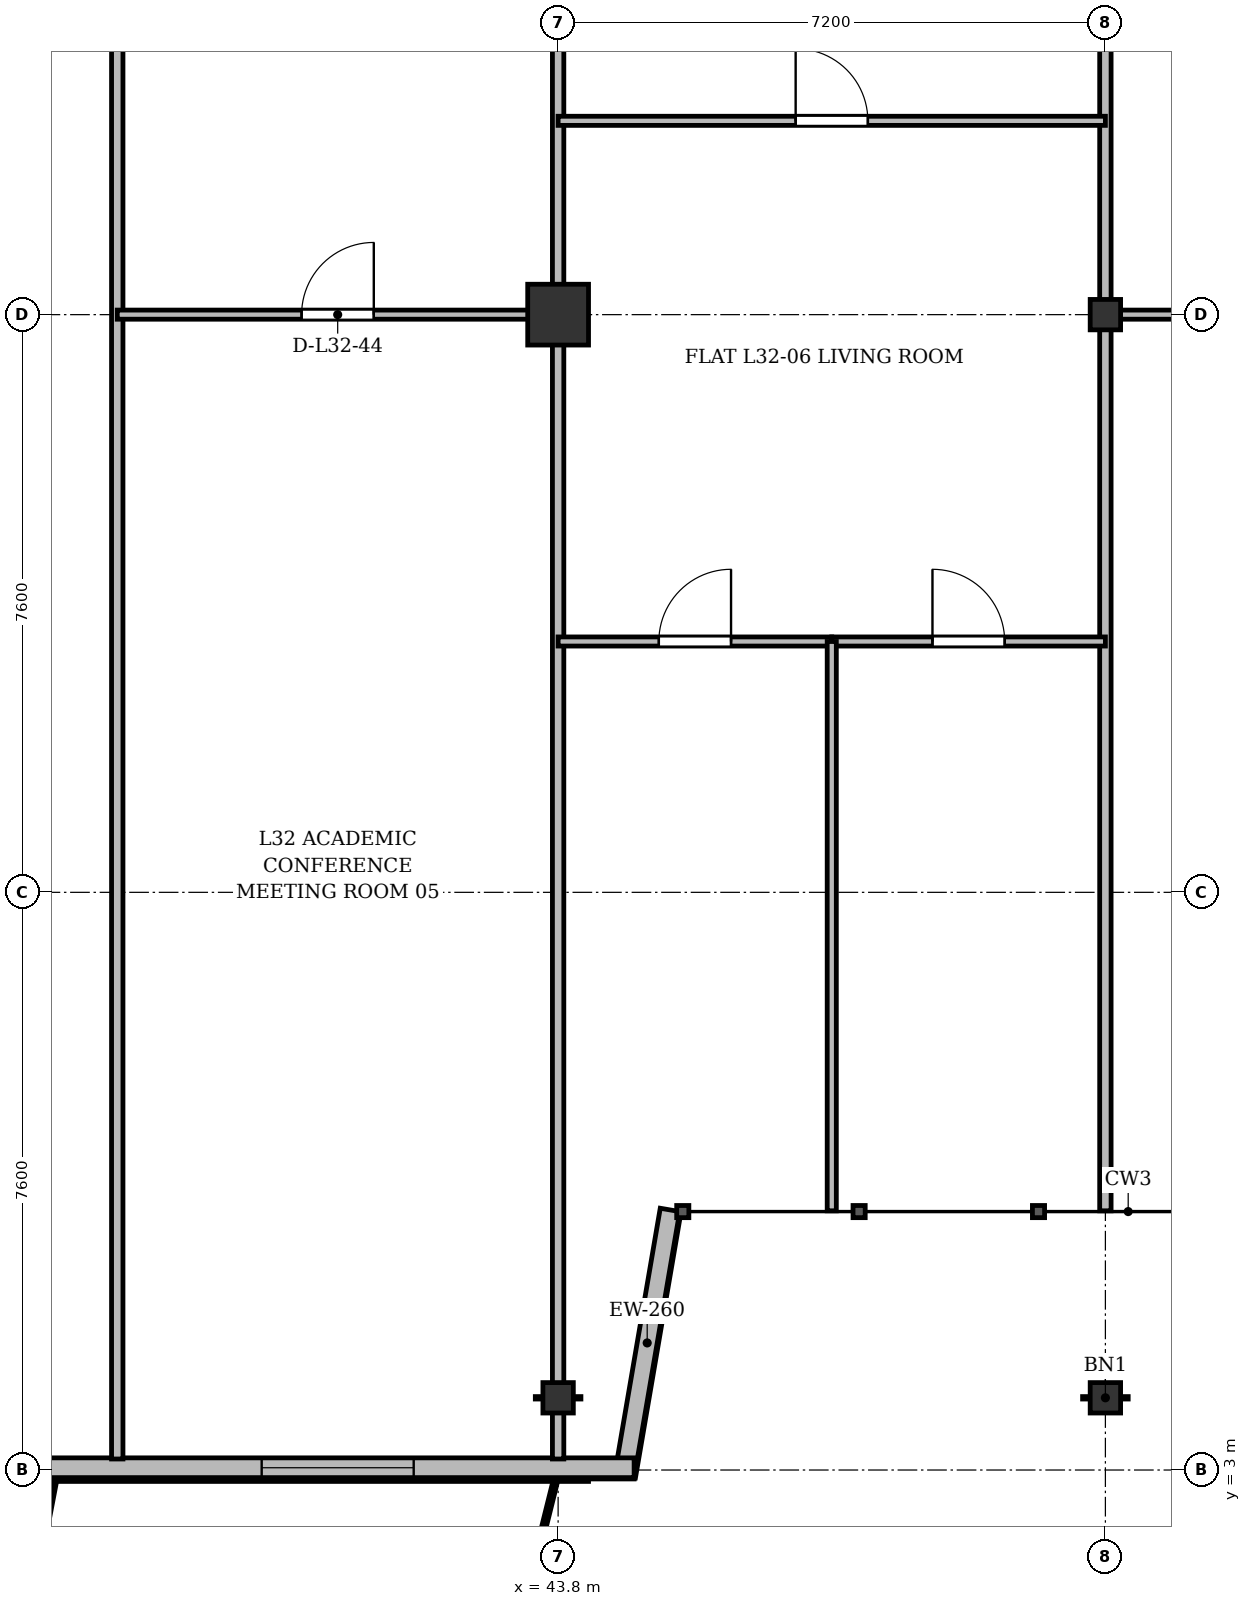
"""IFC4 building model, lengths in metres.
Left out: names, types, materials, properties, quantities, classifications, styles, units other than length and angle.
Written with IfcOpenShell. Run it as: python <this file> out.ifc"""

import sys

from ifc_helpers import new_model, si_unit, direction, frame, frame_2d, origin, origin_2d, place, context, subcontext, project, spatial, rectangle, i_section, extrude, source, transform, mapped, element, fill, save


model = new_model("IFC4")
c1 = context("Model", 3, precision=1e-05, world=origin(), true_north=direction((0.0, 1.0)))
c2 = subcontext(c1, "Body", "Model", "MODEL_VIEW")
j1 = project(units=[si_unit("LENGTHUNIT", "METRE"), si_unit("PLANEANGLEUNIT", "RADIAN")], contexts=[c1])
p1 = place(None, origin())
s1 = spatial("IfcSite", under=j1, at=p1, CompositionType="ELEMENT")
p2 = place(p1, origin())
s2 = spatial("IfcBuilding", under=s1, at=p2, CompositionType="ELEMENT")
p3 = place(p2, frame((0.0, 0.0, 124.9)))
s3 = spatial("IfcBuildingStorey", under=s2, at=p3, CompositionType="ELEMENT", Elevation=124.9)
m1 = source(origin(), c2, "Body", "SweptSolid", [
    extrude(i_section(OverallWidth=0.4, OverallDepth=0.4, WebThickness=0.022, FlangeThickness=0.035, at=origin_2d()), origin(), (0.0, 0.0, 1.0), 3.6),
])
p4 = place(p3, frame((43.8, 3.95, 0.0), z_axis=(0.0, 0.0, 1.0), x_axis=(1.0, 0.0, 0.0)))
e1 = element("IfcColumn", 1, at=p4, inside=s3, PredefinedType="COLUMN", context=c2, shape_type="MappedRepresentation", body=[
    mapped(m1, transform((0.0, 0.0, 0.0), x_axis=(1.0, 0.0, 0.0), y_axis=(0.0, 1.0, 0.0), z_axis=(0.0, 0.0, 1.0), scale=1.0)),
])
m2 = source(origin(), c2, "Body", "SweptSolid", [
    extrude(rectangle(XDim=0.8, YDim=0.8, at=origin_2d()), origin(), (0.0, 0.0, 1.0), 3.6),
])
p5 = place(p3, frame((43.8, 18.2, 0.0), z_axis=(0.0, 0.0, 1.0), x_axis=(1.0, 0.0, 0.0)))
e2 = element("IfcColumn", 2, at=p5, inside=s3, PredefinedType="COLUMN", context=c2, shape_type="MappedRepresentation", body=[
    mapped(m2, transform((0.0, 0.0, 0.0), x_axis=(1.0, 0.0, 0.0), y_axis=(0.0, 1.0, 0.0), z_axis=(0.0, 0.0, 1.0), scale=1.0)),
])
for number, where, z_axis, x_axis in (
    (3, (51.0, 3.95, 0.0), (0.0, 0.0, 1.0), (1.0, 0.0, 0.0)),
    (4, (51.0, 18.2, 0.0), (0.0, 0.0, 1.0), (1.0, 0.0, 0.0)),
):
    element("IfcColumn", number, at=place(p3, frame(where, z_axis=z_axis, x_axis=x_axis)), inside=s3, PredefinedType="COLUMN", context=c2, shape_type="MappedRepresentation", body=[
        mapped(m1, transform((0.0, 0.0, 0.0), x_axis=(1.0, 0.0, 0.0), y_axis=(0.0, 1.0, 0.0), z_axis=(0.0, 0.0, 1.0), scale=1.0)),
    ])
p6 = place(p3, frame((45.272, 6.422, 0.0), z_axis=(0.0, 0.0, 1.0), x_axis=(-0.168990530437, -0.98561767467, 0.0)))
e5 = element("IfcWall", 5, at=p6, inside=s3, PredefinedType="SOLIDWALL", context=c2, shape_type="SweptSolid", body=[
    extrude(rectangle(XDim=3.551, YDim=0.26, at=frame_2d((1.775, 0.0))), origin(), (0.0, 0.0, 1.0), 2.752),
])
p7 = place(p3, frame((44.8, 3.03, 0.0), z_axis=(0.0, 0.0, 1.0), x_axis=(-1.0, 0.0, 0.0)))
e6 = element("IfcWall", 6, at=p7, inside=s3, PredefinedType="SOLIDWALL", context=c2, shape_type="SweptSolid", body=[
    extrude(rectangle(XDim=37.3, YDim=0.26, at=frame_2d((18.65, 0.0))), origin(), (0.0, 0.0, 1.0), 3.34),
])
p8 = place(p7, frame((2.9, 0.0, 0.9)))
e7 = element("IfcOpeningElement", 7, at=p8, cuts=e6, PredefinedType="OPENING", context=c2, shape_type="SweptSolid", body=[
    extrude(rectangle(XDim=2.0, YDim=1.95, at=frame_2d((1.0, 0.975))), frame((0.0, 0.14, 0.0), z_axis=(0.0, -1.0, 0.0), x_axis=(1.0, 0.0, 0.0)), (0.0, 0.0, 1.0), 0.28),
])
p9 = place(p7, frame((9.675, 0.0, 0.9)))
e8 = element("IfcOpeningElement", 8, at=p9, cuts=e6, PredefinedType="OPENING", context=c2, shape_type="SweptSolid", body=[
    extrude(rectangle(XDim=1.65, YDim=1.85, at=frame_2d((0.825, 0.925))), frame((0.0, 0.14, 0.0), z_axis=(0.0, -1.0, 0.0), x_axis=(1.0, 0.0, 0.0)), (0.0, 0.0, 1.0), 0.28),
])
p10 = place(p7, frame((17.109, 0.0, 0.0)))
e9 = element("IfcOpeningElement", 9, at=p10, cuts=e6, PredefinedType="OPENING", context=c2, shape_type="SweptSolid", body=[
    extrude(rectangle(XDim=1.2, YDim=2.2, at=frame_2d((0.6, 1.1))), frame((0.0, 0.14, 0.0), z_axis=(0.0, -1.0, 0.0), x_axis=(1.0, 0.0, 0.0)), (0.0, 0.0, 1.0), 0.28),
])
p11 = place(p7, frame((22.25, 0.0, 0.9)))
e10 = element("IfcOpeningElement", 10, at=p11, cuts=e6, PredefinedType="OPENING", context=c2, shape_type="SweptSolid", body=[
    extrude(rectangle(XDim=2.2, YDim=1.8, at=frame_2d((1.1, 0.9))), frame((0.0, 0.14, 0.0), z_axis=(0.0, -1.0, 0.0), x_axis=(1.0, 0.0, 0.0)), (0.0, 0.0, 1.0), 0.28),
])
p12 = place(p7, frame((26.5, 0.0, 0.9)))
e11 = element("IfcOpeningElement", 11, at=p12, cuts=e6, PredefinedType="OPENING", context=c2, shape_type="SweptSolid", body=[
    extrude(rectangle(XDim=1.5, YDim=1.75, at=frame_2d((0.75, 0.875))), frame((0.0, 0.14, 0.0), z_axis=(0.0, -1.0, 0.0), x_axis=(1.0, 0.0, 0.0)), (0.0, 0.0, 1.0), 0.28),
])
p13 = place(p7, frame((33.727, 0.0, 0.0)))
e12 = element("IfcOpeningElement", 12, at=p13, cuts=e6, PredefinedType="OPENING", context=c2, shape_type="SweptSolid", body=[
    extrude(rectangle(XDim=1.2, YDim=2.2, at=frame_2d((0.6, 1.1))), frame((0.0, 0.14, 0.0), z_axis=(0.0, -1.0, 0.0), x_axis=(1.0, 0.0, 0.0)), (0.0, 0.0, 1.0), 0.28),
])
p14 = place(p3, frame((38.0, 3.145, 0.0), z_axis=(0.0, 0.0, 1.0), x_axis=(0.0, 1.0, 0.0)))
e13 = element("IfcWall", 13, at=p14, inside=s3, PredefinedType="PARTITIONING", context=c2, shape_type="SweptSolid", body=[
    extrude(rectangle(XDim=24.455, YDim=0.15, at=frame_2d((12.228, 0.0))), origin(), (0.0, 0.0, 1.0), 2.752),
])
p15 = place(p3, frame((43.8, 3.145, 0.0), z_axis=(0.0, 0.0, 1.0), x_axis=(0.0, 1.0, 0.0)))
e14 = element("IfcWall", 14, at=p15, inside=s3, PredefinedType="PARTITIONING", context=c2, shape_type="SweptSolid", body=[
    extrude(rectangle(XDim=24.455, YDim=0.15, at=frame_2d((12.228, 0.0))), origin(), (0.0, 0.0, 1.0), 2.84),
])
p16 = place(p3, frame((51.0, 6.41, 0.0), z_axis=(0.0, 0.0, 1.0), x_axis=(0.0, 1.0, 0.0)))
e15 = element("IfcWall", 15, at=p16, inside=s3, PredefinedType="PARTITIONING", context=c2, shape_type="SweptSolid", body=[
    extrude(rectangle(XDim=21.19, YDim=0.15, at=frame_2d((10.595, 0.0))), origin(), (0.0, 0.0, 1.0), 2.84),
])
p17 = place(p3, frame((38.0, 18.2, 0.0), z_axis=(0.0, 0.0, 1.0), x_axis=(1.0, 0.0, 0.0)))
e16 = element("IfcWall", 16, at=p17, inside=s3, PredefinedType="PARTITIONING", context=c2, shape_type="SweptSolid", body=[
    extrude(rectangle(XDim=5.8, YDim=0.12, at=frame_2d((2.9, 0.0))), origin(), (0.0, 0.0, 1.0), 2.752),
])
p18 = place(p17, frame((2.425, 0.0, 0.0)))
e17 = element("IfcOpeningElement", 17, at=p18, cuts=e16, PredefinedType="OPENING", context=c2, shape_type="SweptSolid", body=[
    extrude(rectangle(XDim=0.95, YDim=2.15, at=frame_2d((0.475, 1.075))), frame((0.0, 0.07, 0.0), z_axis=(0.0, -1.0, 0.0), x_axis=(1.0, 0.0, 0.0)), (0.0, 0.0, 1.0), 0.14),
])
p19 = place(p3, frame((43.8, 20.75, 0.0), z_axis=(0.0, 0.0, 1.0), x_axis=(1.0, 0.0, 0.0)))
e18 = element("IfcWall", 18, at=p19, inside=s3, PredefinedType="PARTITIONING", context=c2, shape_type="SweptSolid", body=[
    extrude(rectangle(XDim=7.2, YDim=0.12, at=frame_2d((3.6, 0.0))), origin(), (0.0, 0.0, 1.0), 2.84),
])
p20 = place(p19, frame((3.125, 0.0, 0.0)))
e19 = element("IfcOpeningElement", 19, at=p20, cuts=e18, PredefinedType="OPENING", context=c2, shape_type="SweptSolid", body=[
    extrude(rectangle(XDim=0.95, YDim=2.15, at=frame_2d((0.475, 1.075))), frame((0.0, 0.07, 0.0), z_axis=(0.0, -1.0, 0.0), x_axis=(1.0, 0.0, 0.0)), (0.0, 0.0, 1.0), 0.14),
])
p21 = place(p3, frame((43.8, 13.9, 0.0), z_axis=(0.0, 0.0, 1.0), x_axis=(1.0, 0.0, 0.0)))
e20 = element("IfcWall", 20, at=p21, inside=s3, PredefinedType="PARTITIONING", context=c2, shape_type="SweptSolid", body=[
    extrude(rectangle(XDim=3.6, YDim=0.12, at=frame_2d((1.8, 0.0))), origin(), (0.0, 0.0, 1.0), 2.84),
])
p22 = place(p21, frame((1.325, 0.0, 0.0)))
e21 = element("IfcOpeningElement", 21, at=p22, cuts=e20, PredefinedType="OPENING", context=c2, shape_type="SweptSolid", body=[
    extrude(rectangle(XDim=0.95, YDim=2.15, at=frame_2d((0.475, 1.075))), frame((0.0, 0.07, 0.0), z_axis=(0.0, -1.0, 0.0), x_axis=(1.0, 0.0, 0.0)), (0.0, 0.0, 1.0), 0.14),
])
p23 = place(p3, frame((47.4, 13.9, 0.0), z_axis=(0.0, 0.0, 1.0), x_axis=(1.0, 0.0, 0.0)))
e22 = element("IfcWall", 22, at=p23, inside=s3, PredefinedType="PARTITIONING", context=c2, shape_type="SweptSolid", body=[
    extrude(rectangle(XDim=3.6, YDim=0.12, at=frame_2d((1.8, 0.0))), origin(), (0.0, 0.0, 1.0), 2.84),
])
p24 = place(p23, frame((1.325, 0.0, 0.0)))
e23 = element("IfcOpeningElement", 23, at=p24, cuts=e22, PredefinedType="OPENING", context=c2, shape_type="SweptSolid", body=[
    extrude(rectangle(XDim=0.95, YDim=2.15, at=frame_2d((0.475, 1.075))), frame((0.0, 0.07, 0.0), z_axis=(0.0, -1.0, 0.0), x_axis=(1.0, 0.0, 0.0)), (0.0, 0.0, 1.0), 0.14),
])
p25 = place(p3, frame((47.4, 6.41, 0.0), z_axis=(0.0, 0.0, 1.0), x_axis=(0.0, 1.0, 0.0)))
e24 = element("IfcWall", 24, at=p25, inside=s3, PredefinedType="PARTITIONING", context=c2, shape_type="SweptSolid", body=[
    extrude(rectangle(XDim=7.49, YDim=0.12, at=frame_2d((3.745, 0.0))), origin(), (0.0, 0.0, 1.0), 3.34),
])
p26 = place(p3, frame((51.0, 18.2, 0.0), z_axis=(0.0, 0.0, 1.0), x_axis=(1.0, 0.0, 0.0)))
e25 = element("IfcWall", 25, at=p26, inside=s3, PredefinedType="PARTITIONING", context=c2, shape_type="SweptSolid", body=[
    extrude(rectangle(XDim=7.8, YDim=0.12, at=frame_2d((3.9, 0.0))), origin(), (0.0, 0.0, 1.0), 2.752),
])
p27 = place(p26, frame((3.333, 0.0, 0.0)))
e26 = element("IfcOpeningElement", 26, at=p27, cuts=e25, PredefinedType="OPENING", context=c2, shape_type="SweptSolid", body=[
    extrude(rectangle(XDim=0.95, YDim=2.15, at=frame_2d((0.475, 1.075))), frame((0.0, 0.07, 0.0), z_axis=(0.0, -1.0, 0.0), x_axis=(1.0, 0.0, 0.0)), (0.0, 0.0, 1.0), 0.14),
])
m3 = source(origin(), c2, "Body", "SweptSolid", [
    extrude(rectangle(XDim=2.0, YDim=1.95, at=frame_2d((1.0, 0.975))), frame((0.0, 0.03, 0.0), z_axis=(0.0, -1.0, 0.0), x_axis=(1.0, 0.0, 0.0)), (0.0, 0.0, 1.0), 0.06),
])
p28 = place(p8, origin())
e27 = element("IfcWindow", 27, at=p28, inside=s3, PartitioningType="SINGLE_PANEL", PredefinedType="WINDOW", context=c2, shape_type="MappedRepresentation", body=[
    mapped(m3, transform((0.0, 0.0, 0.0), x_axis=(1.0, 0.0, 0.0), y_axis=(0.0, 1.0, 0.0), z_axis=(0.0, 0.0, 1.0), scale=1.0)),
])
fill(e7, e27)
m4 = source(origin(), c2, "Body", "SweptSolid", [
    extrude(rectangle(XDim=0.95, YDim=2.15, at=frame_2d((0.475, 1.075))), frame((0.0, 0.025, 0.0), z_axis=(0.0, -1.0, 0.0), x_axis=(1.0, 0.0, 0.0)), (0.0, 0.0, 1.0), 0.05),
])
p29 = place(p18, origin())
e28 = element("IfcDoor", 28, at=p29, inside=s3, OperationType="SINGLE_SWING_RIGHT", PredefinedType="DOOR", context=c2, shape_type="MappedRepresentation", body=[
    mapped(m4, transform((0.0, 0.0, 0.0), x_axis=(1.0, 0.0, 0.0), y_axis=(0.0, 1.0, 0.0), z_axis=(0.0, 0.0, 1.0), scale=1.0)),
])
fill(e17, e28)
p30 = place(p20, origin())
e29 = element("IfcDoor", 29, at=p30, inside=s3, OperationType="SINGLE_SWING_LEFT", PredefinedType="DOOR", context=c2, shape_type="MappedRepresentation", body=[
    mapped(m4, transform((0.0, 0.0, 0.0), x_axis=(1.0, 0.0, 0.0), y_axis=(0.0, 1.0, 0.0), z_axis=(0.0, 0.0, 1.0), scale=1.0)),
])
fill(e19, e29)
p31 = place(p22, origin())
e30 = element("IfcDoor", 30, at=p31, inside=s3, OperationType="SINGLE_SWING_RIGHT", PredefinedType="DOOR", context=c2, shape_type="MappedRepresentation", body=[
    mapped(m4, transform((0.0, 0.0, 0.0), x_axis=(1.0, 0.0, 0.0), y_axis=(0.0, 1.0, 0.0), z_axis=(0.0, 0.0, 1.0), scale=1.0)),
])
fill(e21, e30)
p32 = place(p24, origin())
e31 = element("IfcDoor", 31, at=p32, inside=s3, OperationType="SINGLE_SWING_LEFT", PredefinedType="DOOR", context=c2, shape_type="MappedRepresentation", body=[
    mapped(m4, transform((0.0, 0.0, 0.0), x_axis=(1.0, 0.0, 0.0), y_axis=(0.0, 1.0, 0.0), z_axis=(0.0, 0.0, 1.0), scale=1.0)),
])
fill(e23, e31)
save(model, sys.argv[1])
